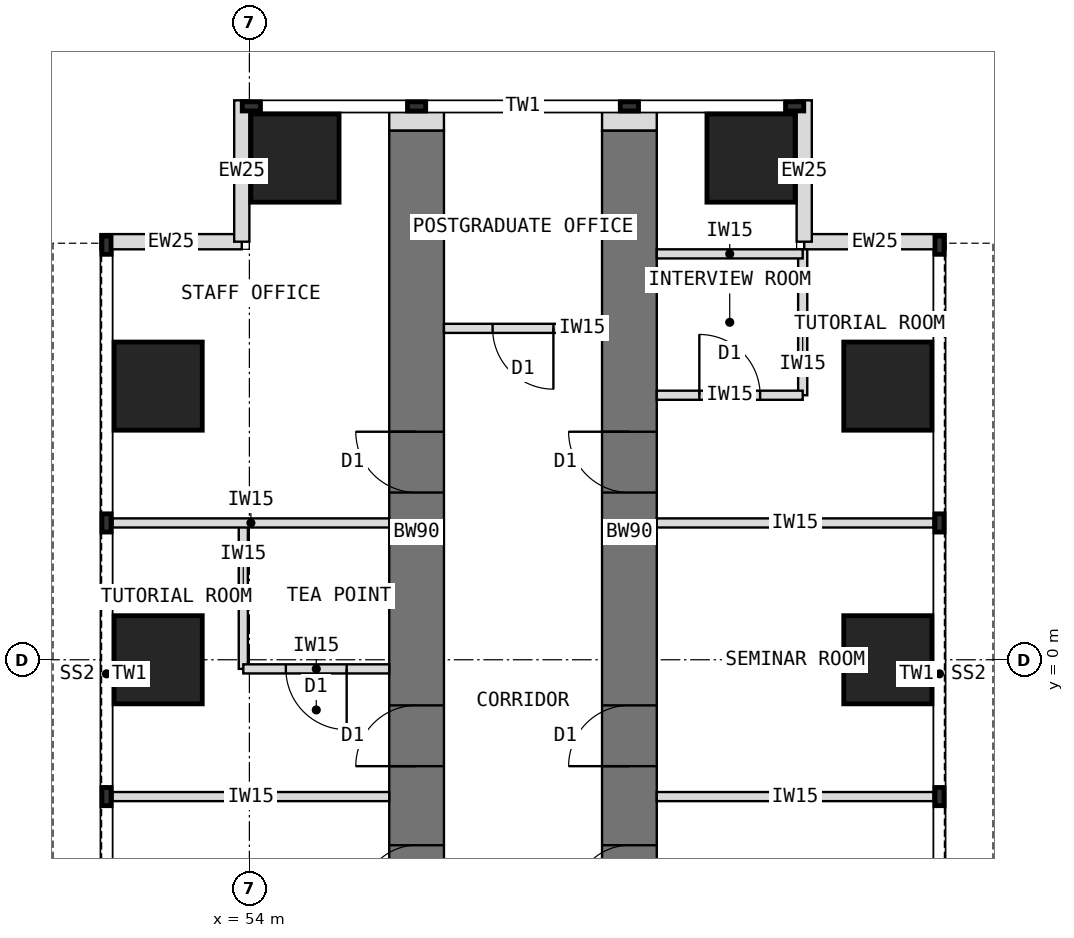
"""IFC4 building model, lengths in metres.
Left out: names, types, materials, properties, quantities, classifications, styles, units other than length and angle.
Written with IfcOpenShell. Run it as: python <this file> out.ifc"""

import sys

from ifc_helpers import new_model, si_unit, direction, frame, frame_2d, origin, origin_2d, place, context, subcontext, project, spatial, rectangle, extrude, element, fill, save


model = new_model("IFC4")
c1 = context("Model", 3, precision=1e-05, world=origin(), true_north=direction((0.0, 1.0)))
c2 = subcontext(c1, "Body", "Model", "MODEL_VIEW")
j1 = project(units=[si_unit("LENGTHUNIT", "METRE"), si_unit("PLANEANGLEUNIT", "RADIAN")], contexts=[c1])
p1 = place(None, origin())
s1 = spatial("IfcSite", under=j1, at=p1, CompositionType="ELEMENT")
p2 = place(p1, origin())
s2 = spatial("IfcBuilding", under=s1, at=p2, CompositionType="ELEMENT")
p3 = place(p2, frame((0.0, 0.0, 52.5)))
s3 = spatial("IfcBuildingStorey", under=s2, at=p3, CompositionType="ELEMENT", Elevation=52.5)
p4 = place(p3, frame((56.75, -4.5, 0.0), z_axis=(0.0, 0.0, 1.0), x_axis=(0.0, 1.0, 0.0)))
e1 = element("IfcWall", 1, at=p4, inside=s3, PredefinedType="SHEAR", context=c2, shape_type="SweptSolid", body=[
    extrude(rectangle(XDim=13.2, YDim=0.9, at=frame_2d((6.6, 0.0))), origin(), (0.0, 0.0, 1.0), 4.0),
])
p5 = place(p4, frame((0.55, 0.0, 0.0)))
e2 = element("IfcOpeningElement", 2, at=p5, cuts=e1, PredefinedType="OPENING", context=c2, shape_type="SweptSolid", body=[
    extrude(rectangle(XDim=0.9, YDim=2.1, at=frame_2d((0.45, 1.05))), frame((0.0, 0.46, 0.0), z_axis=(0.0, -1.0, 0.0), x_axis=(1.0, 0.0, 0.0)), (0.0, 0.0, 1.0), 0.92),
])
p6 = place(p4, frame((2.75, 0.0, 0.0)))
e3 = element("IfcOpeningElement", 3, at=p6, cuts=e1, PredefinedType="OPENING", context=c2, shape_type="SweptSolid", body=[
    extrude(rectangle(XDim=1.0, YDim=2.1, at=frame_2d((0.5, 1.05))), frame((0.0, 0.46, 0.0), z_axis=(0.0, -1.0, 0.0), x_axis=(1.0, 0.0, 0.0)), (0.0, 0.0, 1.0), 0.92),
])
p7 = place(p4, frame((7.25, 0.0, 0.0)))
e4 = element("IfcOpeningElement", 4, at=p7, cuts=e1, PredefinedType="OPENING", context=c2, shape_type="SweptSolid", body=[
    extrude(rectangle(XDim=1.0, YDim=2.1, at=frame_2d((0.5, 1.05))), frame((0.0, 0.46, 0.0), z_axis=(0.0, -1.0, 0.0), x_axis=(1.0, 0.0, 0.0)), (0.0, 0.0, 1.0), 0.92),
])
p8 = place(p3, frame((60.25, -4.5, 0.0), z_axis=(0.0, 0.0, 1.0), x_axis=(0.0, 1.0, 0.0)))
e5 = element("IfcWall", 5, at=p8, inside=s3, PredefinedType="SHEAR", context=c2, shape_type="SweptSolid", body=[
    extrude(rectangle(XDim=13.2, YDim=0.9, at=frame_2d((6.6, 0.0))), origin(), (0.0, 0.0, 1.0), 4.0),
])
p9 = place(p8, frame((0.55, 0.0, 0.0)))
e6 = element("IfcOpeningElement", 6, at=p9, cuts=e5, PredefinedType="OPENING", context=c2, shape_type="SweptSolid", body=[
    extrude(rectangle(XDim=0.9, YDim=2.1, at=frame_2d((0.45, 1.05))), frame((0.0, 0.46, 0.0), z_axis=(0.0, -1.0, 0.0), x_axis=(1.0, 0.0, 0.0)), (0.0, 0.0, 1.0), 0.92),
])
p10 = place(p8, frame((2.75, 0.0, 0.0)))
e7 = element("IfcOpeningElement", 7, at=p10, cuts=e5, PredefinedType="OPENING", context=c2, shape_type="SweptSolid", body=[
    extrude(rectangle(XDim=1.0, YDim=2.1, at=frame_2d((0.5, 1.05))), frame((0.0, 0.46, 0.0), z_axis=(0.0, -1.0, 0.0), x_axis=(1.0, 0.0, 0.0)), (0.0, 0.0, 1.0), 0.92),
])
p11 = place(p8, frame((7.25, 0.0, 0.0)))
e8 = element("IfcOpeningElement", 8, at=p11, cuts=e5, PredefinedType="OPENING", context=c2, shape_type="SweptSolid", body=[
    extrude(rectangle(XDim=1.0, YDim=2.1, at=frame_2d((0.5, 1.05))), frame((0.0, 0.46, 0.0), z_axis=(0.0, -1.0, 0.0), x_axis=(1.0, 0.0, 0.0)), (0.0, 0.0, 1.0), 0.92),
])
for number, where, z_axis, x_axis in (
    (9, (52.5, 0.0, 0.0), (0.0, 0.0, 1.0), (1.0, 0.0, 0.0)),
    (10, (64.5, 0.0, 0.0), (0.0, 0.0, 1.0), (1.0, 0.0, 0.0)),
    (11, (52.5, 4.5, 0.0), (0.0, 0.0, 1.0), (1.0, 0.0, 0.0)),
    (12, (64.5, 4.5, 0.0), (0.0, 0.0, 1.0), (1.0, 0.0, 0.0)),
    (13, (54.75, 8.25, 0.0), (0.0, 0.0, 1.0), (1.0, 0.0, 0.0)),
    (14, (62.25, 8.25, 0.0), (0.0, 0.0, 1.0), (1.0, 0.0, 0.0)),
):
    element("IfcColumn", number, at=place(p3, frame(where, z_axis=z_axis, x_axis=x_axis)), inside=s3, PredefinedType="COLUMN", context=c2, shape_type="SweptSolid", body=[
        extrude(rectangle(XDim=1.45, YDim=1.45, at=origin_2d()), origin(), (0.0, 0.0, 1.0), 4.0),
    ])
for number, where, z_axis, x_axis in (
    (15, (51.55, 6.875, 0.0), (0.0, 0.0, 1.0), (1.0, 0.0, 0.0)),
    (16, (53.875, 6.875, 0.0), (0.0, 0.0, 1.0), (0.0, 1.0, 0.0)),
    (17, (65.45, 6.875, 0.0), (0.0, 0.0, 1.0), (-1.0, 0.0, 0.0)),
    (18, (63.125, 6.875, 0.0), (0.0, 0.0, 1.0), (0.0, 1.0, 0.0)),
):
    element("IfcWall", number, at=place(p3, frame(where, z_axis=z_axis, x_axis=x_axis)), inside=s3, PredefinedType="STANDARD", context=c2, shape_type="SweptSolid", body=[
        extrude(rectangle(XDim=2.325, YDim=0.25, at=frame_2d((1.163, 0.0))), origin(), (0.0, 0.0, 1.0), 3.8),
    ])
for number, where, z_axis, x_axis in (
    (19, (56.75, 8.7, 0.0), (0.0, 0.0, 1.0), (0.0, 1.0, 0.0)),
    (20, (60.25, 8.7, 0.0), (0.0, 0.0, 1.0), (0.0, 1.0, 0.0)),
):
    element("IfcWall", number, at=place(p3, frame(where, z_axis=z_axis, x_axis=x_axis)), inside=s3, PredefinedType="PARTITIONING", context=c2, shape_type="SweptSolid", body=[
        extrude(rectangle(XDim=0.31, YDim=0.9, at=frame_2d((0.155, 0.0))), origin(), (0.0, 0.0, 1.0), 3.8),
    ])
for number, where, z_axis, x_axis in (
    (21, (56.3, -2.25, 0.0), (0.0, 0.0, 1.0), (-1.0, 0.0, 0.0)),
    (22, (56.3, 2.25, 0.0), (0.0, 0.0, 1.0), (-1.0, 0.0, 0.0)),
):
    element("IfcWall", number, at=place(p3, frame(where, z_axis=z_axis, x_axis=x_axis)), inside=s3, PredefinedType="PARTITIONING", context=c2, shape_type="SweptSolid", body=[
        extrude(rectangle(XDim=4.55, YDim=0.15, at=frame_2d((2.275, 0.0))), origin(), (0.0, 0.0, 1.0), 3.8),
    ])
p12 = place(p3, frame((53.9, -0.15, 0.0), z_axis=(0.0, 0.0, 1.0), x_axis=(0.0, 1.0, 0.0)))
e23 = element("IfcWall", 23, at=p12, inside=s3, PredefinedType="PARTITIONING", context=c2, shape_type="SweptSolid", body=[
    extrude(rectangle(XDim=2.4, YDim=0.15, at=frame_2d((1.2, 0.0))), origin(), (0.0, 0.0, 1.0), 3.8),
])
p13 = place(p3, frame((56.3, -0.15, 0.0), z_axis=(0.0, 0.0, 1.0), x_axis=(-1.0, 0.0, 0.0)))
e24 = element("IfcWall", 24, at=p13, inside=s3, PredefinedType="PARTITIONING", context=c2, shape_type="SweptSolid", body=[
    extrude(rectangle(XDim=2.4, YDim=0.15, at=frame_2d((1.2, 0.0))), origin(), (0.0, 0.0, 1.0), 3.8),
])
p14 = place(p13, frame((0.7, 0.0, 0.0)))
e25 = element("IfcOpeningElement", 25, at=p14, cuts=e24, PredefinedType="OPENING", context=c2, shape_type="SweptSolid", body=[
    extrude(rectangle(XDim=1.0, YDim=2.1, at=frame_2d((0.5, 1.05))), frame((0.0, 0.085, 0.0), z_axis=(0.0, -1.0, 0.0), x_axis=(1.0, 0.0, 0.0)), (0.0, 0.0, 1.0), 0.17),
])
for number, where, z_axis, x_axis in (
    (26, (60.7, -2.25, 0.0), (0.0, 0.0, 1.0), (1.0, 0.0, 0.0)),
    (27, (60.7, 2.25, 0.0), (0.0, 0.0, 1.0), (1.0, 0.0, 0.0)),
):
    element("IfcWall", number, at=place(p3, frame(where, z_axis=z_axis, x_axis=x_axis)), inside=s3, PredefinedType="PARTITIONING", context=c2, shape_type="SweptSolid", body=[
        extrude(rectangle(XDim=4.55, YDim=0.15, at=frame_2d((2.275, 0.0))), origin(), (0.0, 0.0, 1.0), 3.8),
    ])
p15 = place(p3, frame((63.1, 4.35, 0.0), z_axis=(0.0, 0.0, 1.0), x_axis=(0.0, 1.0, 0.0)))
e28 = element("IfcWall", 28, at=p15, inside=s3, PredefinedType="PARTITIONING", context=c2, shape_type="SweptSolid", body=[
    extrude(rectangle(XDim=2.4, YDim=0.15, at=frame_2d((1.2, 0.0))), origin(), (0.0, 0.0, 1.0), 3.8),
])
p16 = place(p3, frame((60.7, 4.35, 0.0), z_axis=(0.0, 0.0, 1.0), x_axis=(1.0, 0.0, 0.0)))
e29 = element("IfcWall", 29, at=p16, inside=s3, PredefinedType="PARTITIONING", context=c2, shape_type="SweptSolid", body=[
    extrude(rectangle(XDim=2.4, YDim=0.15, at=frame_2d((1.2, 0.0))), origin(), (0.0, 0.0, 1.0), 3.8),
])
p17 = place(p16, frame((0.7, 0.0, 0.0)))
e30 = element("IfcOpeningElement", 30, at=p17, cuts=e29, PredefinedType="OPENING", context=c2, shape_type="SweptSolid", body=[
    extrude(rectangle(XDim=1.0, YDim=2.1, at=frame_2d((0.5, 1.05))), frame((0.0, 0.085, 0.0), z_axis=(0.0, -1.0, 0.0), x_axis=(1.0, 0.0, 0.0)), (0.0, 0.0, 1.0), 0.17),
])
p18 = place(p3, frame((60.7, 6.675, 0.0), z_axis=(0.0, 0.0, 1.0), x_axis=(1.0, 0.0, 0.0)))
e31 = element("IfcWall", 31, at=p18, inside=s3, PredefinedType="PARTITIONING", context=c2, shape_type="SweptSolid", body=[
    extrude(rectangle(XDim=2.4, YDim=0.15, at=frame_2d((1.2, 0.0))), origin(), (0.0, 0.0, 1.0), 3.8),
])
p19 = place(p3, frame((59.8, 5.45, 0.0), z_axis=(0.0, 0.0, 1.0), x_axis=(-1.0, 0.0, 0.0)))
e32 = element("IfcWall", 32, at=p19, inside=s3, PredefinedType="PARTITIONING", context=c2, shape_type="SweptSolid", body=[
    extrude(rectangle(XDim=2.6, YDim=0.15, at=frame_2d((1.3, 0.0))), origin(), (0.0, 0.0, 1.0), 3.8),
])
p20 = place(p19, frame((0.8, 0.0, 0.0)))
e33 = element("IfcOpeningElement", 33, at=p20, cuts=e32, PredefinedType="OPENING", context=c2, shape_type="SweptSolid", body=[
    extrude(rectangle(XDim=1.0, YDim=2.1, at=frame_2d((0.5, 1.05))), frame((0.0, 0.085, 0.0), z_axis=(0.0, -1.0, 0.0), x_axis=(1.0, 0.0, 0.0)), (0.0, 0.0, 1.0), 0.17),
])
p21 = place(p14, origin())
e34 = element("IfcDoor", 34, at=p21, inside=s3, OperationType="SINGLE_SWING_LEFT", PredefinedType="DOOR", context=c2, shape_type="SweptSolid", body=[
    extrude(rectangle(XDim=1.0, YDim=2.1, at=frame_2d((0.5, 1.05))), frame((0.0, 0.025, 0.0), z_axis=(0.0, -1.0, 0.0), x_axis=(1.0, 0.0, 0.0)), (0.0, 0.0, 1.0), 0.05),
])
fill(e25, e34)
p22 = place(p17, origin())
e35 = element("IfcDoor", 35, at=p22, inside=s3, OperationType="SINGLE_SWING_LEFT", PredefinedType="DOOR", context=c2, shape_type="SweptSolid", body=[
    extrude(rectangle(XDim=1.0, YDim=2.1, at=frame_2d((0.5, 1.05))), frame((0.0, 0.025, 0.0), z_axis=(0.0, -1.0, 0.0), x_axis=(1.0, 0.0, 0.0)), (0.0, 0.0, 1.0), 0.05),
])
fill(e30, e35)
p23 = place(p20, origin())
e36 = element("IfcDoor", 36, at=p23, inside=s3, OperationType="SINGLE_SWING_LEFT", PredefinedType="DOOR", context=c2, shape_type="SweptSolid", body=[
    extrude(rectangle(XDim=1.0, YDim=2.1, at=frame_2d((0.5, 1.05))), frame((0.0, 0.025, 0.0), z_axis=(0.0, -1.0, 0.0), x_axis=(1.0, 0.0, 0.0)), (0.0, 0.0, 1.0), 0.05),
])
fill(e33, e36)
p24 = place(p5, origin())
e37 = element("IfcDoor", 37, at=p24, inside=s3, OperationType="SINGLE_SWING_LEFT", PredefinedType="DOOR", context=c2, shape_type="SweptSolid", body=[
    extrude(rectangle(XDim=0.82, YDim=2.06, at=frame_2d((0.45, 1.03))), frame((0.0, 0.025, 0.0), z_axis=(0.0, -1.0, 0.0), x_axis=(1.0, 0.0, 0.0)), (0.0, 0.0, 1.0), 0.05),
    extrude(rectangle(XDim=0.04, YDim=2.1, at=frame_2d((0.02, 1.05))), frame((0.0, 0.45, 0.0), z_axis=(0.0, -1.0, 0.0), x_axis=(1.0, 0.0, 0.0)), (0.0, 0.0, 1.0), 0.899),
    extrude(rectangle(XDim=0.04, YDim=2.1, at=frame_2d((0.88, 1.05))), frame((0.0, 0.45, 0.0), z_axis=(0.0, -1.0, 0.0), x_axis=(1.0, 0.0, 0.0)), (0.0, 0.0, 1.0), 0.899),
    extrude(rectangle(XDim=0.82, YDim=0.04, at=frame_2d((0.45, 2.08))), frame((0.0, 0.45, 0.0), z_axis=(0.0, -1.0, 0.0), x_axis=(1.0, 0.0, 0.0)), (0.0, 0.0, 1.0), 0.899),
])
fill(e2, e37)
p25 = place(p6, origin())
e38 = element("IfcDoor", 38, at=p25, inside=s3, OperationType="SINGLE_SWING_LEFT", PredefinedType="DOOR", context=c2, shape_type="SweptSolid", body=[
    extrude(rectangle(XDim=0.92, YDim=2.06, at=frame_2d((0.5, 1.03))), frame((0.0, 0.025, 0.0), z_axis=(0.0, -1.0, 0.0), x_axis=(1.0, 0.0, 0.0)), (0.0, 0.0, 1.0), 0.05),
    extrude(rectangle(XDim=0.04, YDim=2.1, at=frame_2d((0.02, 1.05))), frame((0.0, 0.45, 0.0), z_axis=(0.0, -1.0, 0.0), x_axis=(1.0, 0.0, 0.0)), (0.0, 0.0, 1.0), 0.899),
    extrude(rectangle(XDim=0.04, YDim=2.1, at=frame_2d((0.98, 1.05))), frame((0.0, 0.45, 0.0), z_axis=(0.0, -1.0, 0.0), x_axis=(1.0, 0.0, 0.0)), (0.0, 0.0, 1.0), 0.899),
    extrude(rectangle(XDim=0.92, YDim=0.04, at=frame_2d((0.5, 2.08))), frame((0.0, 0.45, 0.0), z_axis=(0.0, -1.0, 0.0), x_axis=(1.0, 0.0, 0.0)), (0.0, 0.0, 1.0), 0.899),
])
fill(e3, e38)
p26 = place(p7, origin())
e39 = element("IfcDoor", 39, at=p26, inside=s3, OperationType="SINGLE_SWING_RIGHT", PredefinedType="DOOR", context=c2, shape_type="SweptSolid", body=[
    extrude(rectangle(XDim=0.92, YDim=2.06, at=frame_2d((0.5, 1.03))), frame((0.0, 0.025, 0.0), z_axis=(0.0, -1.0, 0.0), x_axis=(1.0, 0.0, 0.0)), (0.0, 0.0, 1.0), 0.05),
    extrude(rectangle(XDim=0.04, YDim=2.1, at=frame_2d((0.02, 1.05))), frame((0.0, 0.45, 0.0), z_axis=(0.0, -1.0, 0.0), x_axis=(1.0, 0.0, 0.0)), (0.0, 0.0, 1.0), 0.899),
    extrude(rectangle(XDim=0.04, YDim=2.1, at=frame_2d((0.98, 1.05))), frame((0.0, 0.45, 0.0), z_axis=(0.0, -1.0, 0.0), x_axis=(1.0, 0.0, 0.0)), (0.0, 0.0, 1.0), 0.899),
    extrude(rectangle(XDim=0.92, YDim=0.04, at=frame_2d((0.5, 2.08))), frame((0.0, 0.45, 0.0), z_axis=(0.0, -1.0, 0.0), x_axis=(1.0, 0.0, 0.0)), (0.0, 0.0, 1.0), 0.899),
])
fill(e4, e39)
p27 = place(p9, origin())
e40 = element("IfcDoor", 40, at=p27, inside=s3, OperationType="SINGLE_SWING_LEFT", PredefinedType="DOOR", context=c2, shape_type="SweptSolid", body=[
    extrude(rectangle(XDim=0.82, YDim=2.06, at=frame_2d((0.45, 1.03))), frame((0.0, 0.025, 0.0), z_axis=(0.0, -1.0, 0.0), x_axis=(1.0, 0.0, 0.0)), (0.0, 0.0, 1.0), 0.05),
    extrude(rectangle(XDim=0.04, YDim=2.1, at=frame_2d((0.02, 1.05))), frame((0.0, 0.45, 0.0), z_axis=(0.0, -1.0, 0.0), x_axis=(1.0, 0.0, 0.0)), (0.0, 0.0, 1.0), 0.899),
    extrude(rectangle(XDim=0.04, YDim=2.1, at=frame_2d((0.88, 1.05))), frame((0.0, 0.45, 0.0), z_axis=(0.0, -1.0, 0.0), x_axis=(1.0, 0.0, 0.0)), (0.0, 0.0, 1.0), 0.899),
    extrude(rectangle(XDim=0.82, YDim=0.04, at=frame_2d((0.45, 2.08))), frame((0.0, 0.45, 0.0), z_axis=(0.0, -1.0, 0.0), x_axis=(1.0, 0.0, 0.0)), (0.0, 0.0, 1.0), 0.899),
])
fill(e6, e40)
p28 = place(p10, origin())
e41 = element("IfcDoor", 41, at=p28, inside=s3, OperationType="SINGLE_SWING_LEFT", PredefinedType="DOOR", context=c2, shape_type="SweptSolid", body=[
    extrude(rectangle(XDim=0.92, YDim=2.06, at=frame_2d((0.5, 1.03))), frame((0.0, 0.025, 0.0), z_axis=(0.0, -1.0, 0.0), x_axis=(1.0, 0.0, 0.0)), (0.0, 0.0, 1.0), 0.05),
    extrude(rectangle(XDim=0.04, YDim=2.1, at=frame_2d((0.02, 1.05))), frame((0.0, 0.45, 0.0), z_axis=(0.0, -1.0, 0.0), x_axis=(1.0, 0.0, 0.0)), (0.0, 0.0, 1.0), 0.899),
    extrude(rectangle(XDim=0.04, YDim=2.1, at=frame_2d((0.98, 1.05))), frame((0.0, 0.45, 0.0), z_axis=(0.0, -1.0, 0.0), x_axis=(1.0, 0.0, 0.0)), (0.0, 0.0, 1.0), 0.899),
    extrude(rectangle(XDim=0.92, YDim=0.04, at=frame_2d((0.5, 2.08))), frame((0.0, 0.45, 0.0), z_axis=(0.0, -1.0, 0.0), x_axis=(1.0, 0.0, 0.0)), (0.0, 0.0, 1.0), 0.899),
])
fill(e7, e41)
p29 = place(p11, origin())
e42 = element("IfcDoor", 42, at=p29, inside=s3, OperationType="SINGLE_SWING_RIGHT", PredefinedType="DOOR", context=c2, shape_type="SweptSolid", body=[
    extrude(rectangle(XDim=0.92, YDim=2.06, at=frame_2d((0.5, 1.03))), frame((0.0, 0.025, 0.0), z_axis=(0.0, -1.0, 0.0), x_axis=(1.0, 0.0, 0.0)), (0.0, 0.0, 1.0), 0.05),
    extrude(rectangle(XDim=0.04, YDim=2.1, at=frame_2d((0.02, 1.05))), frame((0.0, 0.45, 0.0), z_axis=(0.0, -1.0, 0.0), x_axis=(1.0, 0.0, 0.0)), (0.0, 0.0, 1.0), 0.899),
    extrude(rectangle(XDim=0.04, YDim=2.1, at=frame_2d((0.98, 1.05))), frame((0.0, 0.45, 0.0), z_axis=(0.0, -1.0, 0.0), x_axis=(1.0, 0.0, 0.0)), (0.0, 0.0, 1.0), 0.899),
    extrude(rectangle(XDim=0.92, YDim=0.04, at=frame_2d((0.5, 2.08))), frame((0.0, 0.45, 0.0), z_axis=(0.0, -1.0, 0.0), x_axis=(1.0, 0.0, 0.0)), (0.0, 0.0, 1.0), 0.899),
])
fill(e8, e42)
save(model, sys.argv[1])
